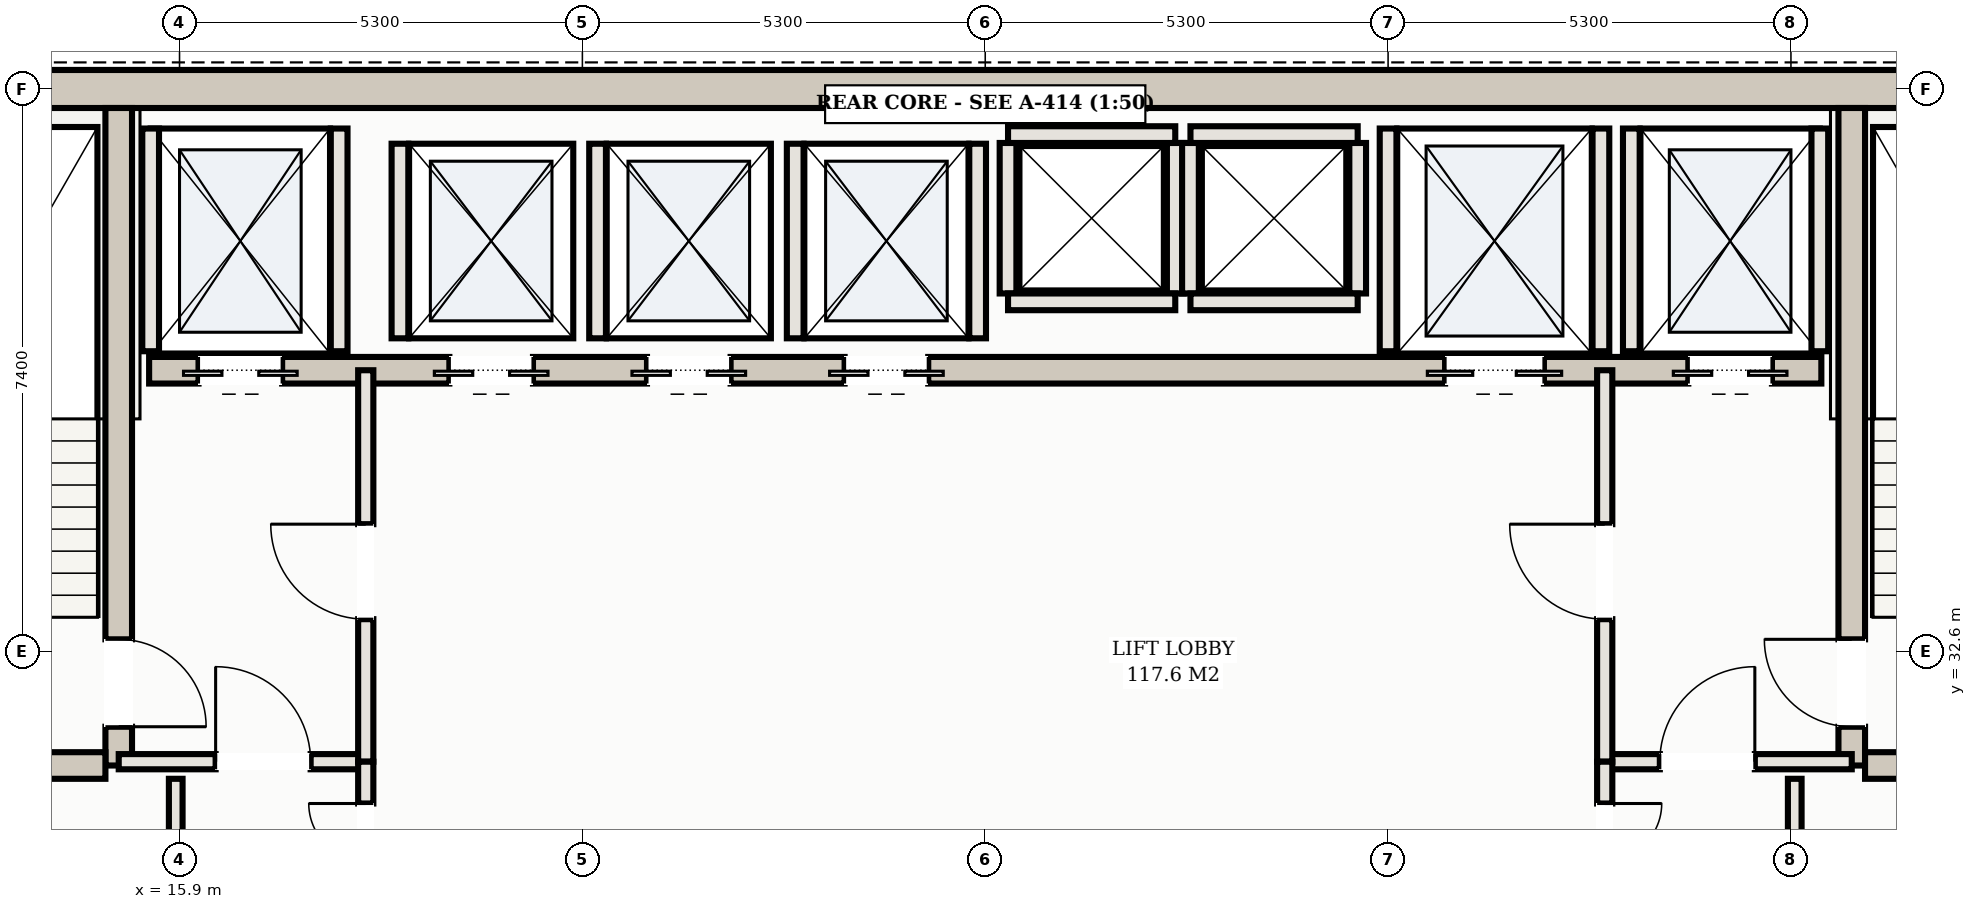
"""IFC4 building model, lengths in metres.
Left out: names, types, materials, properties, quantities, classifications, styles, units other than length and angle.
Written with IfcOpenShell. Run it as: python <this file> out.ifc"""

import sys

from ifc_helpers import new_model, si_unit, direction, frame, frame_2d, origin, place, context, subcontext, project, spatial, rectangle, extrude, element, fill, save


model = new_model("IFC4")
c1 = context("Model", 3, precision=1e-05, world=origin(), true_north=direction((0.0, 1.0)))
c2 = subcontext(c1, "Body", "Model", "MODEL_VIEW")
j1 = project(units=[si_unit("LENGTHUNIT", "METRE"), si_unit("PLANEANGLEUNIT", "RADIAN")], contexts=[c1])
p1 = place(None, origin())
s1 = spatial("IfcSite", under=j1, at=p1, CompositionType="ELEMENT")
p2 = place(p1, origin())
s2 = spatial("IfcBuilding", under=s1, at=p2, CompositionType="ELEMENT")
p3 = place(p2, frame((0.0, 0.0, 213.2)))
s3 = spatial("IfcBuildingStorey", under=s2, at=p3, CompositionType="ELEMENT", Elevation=213.2)
p4 = place(p3, frame((10.35, 40.0, 0.0), z_axis=(0.0, 0.0, 1.0), x_axis=(1.0, 0.0, 0.0)))
e1 = element("IfcWall", 1, at=p4, inside=s3, PredefinedType="SHEAR", context=c2, shape_type="SweptSolid", body=[
    extrude(rectangle(XDim=32.3, YDim=0.5, at=frame_2d((16.15, 0.0))), origin(), (0.0, 0.0, 1.0), 3.11),
])
p5 = place(p3, frame((15.1, 31.1, 0.0), z_axis=(0.0, 0.0, 1.0), x_axis=(0.0, 1.0, 0.0)))
e2 = element("IfcWall", 2, at=p5, inside=s3, PredefinedType="SHEAR", context=c2, shape_type="SweptSolid", body=[
    extrude(rectangle(XDim=8.65, YDim=0.35, at=frame_2d((4.325, 0.0))), origin(), (0.0, 0.0, 1.0), 3.11),
])
p6 = place(p5, frame((0.51, 0.0, 0.0)))
e3 = element("IfcOpeningElement", 3, at=p6, cuts=e2, PredefinedType="OPENING", context=c2, shape_type="SweptSolid", body=[
    extrude(rectangle(XDim=1.15, YDim=2.2, at=frame_2d((0.575, 1.1))), frame((0.0, 0.185, 0.0), z_axis=(0.0, -1.0, 0.0), x_axis=(1.0, 0.0, 0.0)), (0.0, 0.0, 1.0), 0.37),
])
p7 = place(p3, frame((10.85, 31.1, 0.0), z_axis=(0.0, 0.0, 1.0), x_axis=(1.0, 0.0, 0.0)))
e4 = element("IfcWall", 4, at=p7, inside=s3, PredefinedType="SHEAR", context=c2, shape_type="SweptSolid", body=[
    extrude(rectangle(XDim=4.075, YDim=0.35, at=frame_2d((2.038, 0.0))), origin(), (0.0, 0.0, 1.0), 3.11),
])
p8 = place(p3, frame((37.9, 31.1, 0.0), z_axis=(0.0, 0.0, 1.0), x_axis=(0.0, 1.0, 0.0)))
e5 = element("IfcWall", 5, at=p8, inside=s3, PredefinedType="SHEAR", context=c2, shape_type="SweptSolid", body=[
    extrude(rectangle(XDim=8.65, YDim=0.35, at=frame_2d((4.325, 0.0))), origin(), (0.0, 0.0, 1.0), 3.11),
])
p9 = place(p8, frame((0.51, 0.0, 0.0)))
e6 = element("IfcOpeningElement", 6, at=p9, cuts=e5, PredefinedType="OPENING", context=c2, shape_type="SweptSolid", body=[
    extrude(rectangle(XDim=1.15, YDim=2.2, at=frame_2d((0.575, 1.1))), frame((0.0, 0.185, 0.0), z_axis=(0.0, -1.0, 0.0), x_axis=(1.0, 0.0, 0.0)), (0.0, 0.0, 1.0), 0.37),
])
p10 = place(p3, frame((38.075, 31.1, 0.0), z_axis=(0.0, 0.0, 1.0), x_axis=(1.0, 0.0, 0.0)))
e7 = element("IfcWall", 7, at=p10, inside=s3, PredefinedType="SHEAR", context=c2, shape_type="SweptSolid", body=[
    extrude(rectangle(XDim=4.075, YDim=0.35, at=frame_2d((2.038, 0.0))), origin(), (0.0, 0.0, 1.0), 3.11),
])
p11 = place(p3, frame((15.5, 36.3, 0.0), z_axis=(0.0, 0.0, 1.0), x_axis=(1.0, 0.0, 0.0)))
e8 = element("IfcWall", 8, at=p11, inside=s3, PredefinedType="SHEAR", context=c2, shape_type="SweptSolid", body=[
    extrude(rectangle(XDim=22.0, YDim=0.35, at=frame_2d((11.0, 0.0))), origin(), (0.0, 0.0, 1.0), 3.11),
])
p12 = place(p11, frame((0.65, 0.0, 0.0)))
e9 = element("IfcOpeningElement", 9, at=p12, cuts=e8, PredefinedType="OPENING", context=c2, shape_type="SweptSolid", body=[
    extrude(rectangle(XDim=1.1, YDim=2.15, at=frame_2d((0.55, 1.075))), frame((0.0, 0.185, 0.0), z_axis=(0.0, -1.0, 0.0), x_axis=(1.0, 0.0, 0.0)), (0.0, 0.0, 1.0), 0.37),
])
p13 = place(p11, frame((20.25, 0.0, 0.0)))
e10 = element("IfcOpeningElement", 10, at=p13, cuts=e8, PredefinedType="OPENING", context=c2, shape_type="SweptSolid", body=[
    extrude(rectangle(XDim=1.1, YDim=2.15, at=frame_2d((0.55, 1.075))), frame((0.0, 0.185, 0.0), z_axis=(0.0, -1.0, 0.0), x_axis=(1.0, 0.0, 0.0)), (0.0, 0.0, 1.0), 0.37),
])
p14 = place(p11, frame((17.05, 0.0, 0.0)))
e11 = element("IfcOpeningElement", 11, at=p14, cuts=e8, PredefinedType="OPENING", context=c2, shape_type="SweptSolid", body=[
    extrude(rectangle(XDim=1.3, YDim=2.2, at=frame_2d((0.65, 1.1))), frame((0.0, 0.185, 0.0), z_axis=(0.0, -1.0, 0.0), x_axis=(1.0, 0.0, 0.0)), (0.0, 0.0, 1.0), 0.37),
])
p15 = place(p11, frame((3.95, 0.0, 0.0)))
e12 = element("IfcOpeningElement", 12, at=p15, cuts=e8, PredefinedType="OPENING", context=c2, shape_type="SweptSolid", body=[
    extrude(rectangle(XDim=1.1, YDim=2.15, at=frame_2d((0.55, 1.075))), frame((0.0, 0.185, 0.0), z_axis=(0.0, -1.0, 0.0), x_axis=(1.0, 0.0, 0.0)), (0.0, 0.0, 1.0), 0.37),
])
p16 = place(p11, frame((6.55, 0.0, 0.0)))
e13 = element("IfcOpeningElement", 13, at=p16, cuts=e8, PredefinedType="OPENING", context=c2, shape_type="SweptSolid", body=[
    extrude(rectangle(XDim=1.1, YDim=2.15, at=frame_2d((0.55, 1.075))), frame((0.0, 0.185, 0.0), z_axis=(0.0, -1.0, 0.0), x_axis=(1.0, 0.0, 0.0)), (0.0, 0.0, 1.0), 0.37),
])
p17 = place(p11, frame((9.15, 0.0, 0.0)))
e14 = element("IfcOpeningElement", 14, at=p17, cuts=e8, PredefinedType="OPENING", context=c2, shape_type="SweptSolid", body=[
    extrude(rectangle(XDim=1.1, YDim=2.15, at=frame_2d((0.55, 1.075))), frame((0.0, 0.185, 0.0), z_axis=(0.0, -1.0, 0.0), x_axis=(1.0, 0.0, 0.0)), (0.0, 0.0, 1.0), 0.37),
])
for number, where, z_axis, x_axis in (
    (15, (15.52, 36.55, 0.0), (0.0, 0.0, 1.0), (0.0, 1.0, 0.0)),
    (16, (18.0, 36.55, 0.0), (0.0, 0.0, 1.0), (0.0, 1.0, 0.0)),
    (17, (35.0, 36.55, 0.0), (0.0, 0.0, 1.0), (0.0, 1.0, 0.0)),
    (18, (37.48, 36.55, 0.0), (0.0, 0.0, 1.0), (0.0, 1.0, 0.0)),
    (19, (31.8, 36.55, 0.0), (0.0, 0.0, 1.0), (0.0, 1.0, 0.0)),
    (20, (34.6, 36.55, 0.0), (0.0, 0.0, 1.0), (0.0, 1.0, 0.0)),
):
    element("IfcWall", number, at=place(p3, frame(where, z_axis=z_axis, x_axis=x_axis)), inside=s3, PredefinedType="SOLIDWALL", context=c2, shape_type="SweptSolid", body=[
        extrude(rectangle(XDim=2.93, YDim=0.22, at=frame_2d((1.465, 0.0))), origin(), (0.0, 0.0, 1.0), 3.11),
    ])
for number, where, z_axis, x_axis in (
    (21, (18.8, 36.72, 0.0), (0.0, 0.0, 1.0), (0.0, 1.0, 0.0)),
    (22, (21.4, 36.72, 0.0), (0.0, 0.0, 1.0), (0.0, 1.0, 0.0)),
    (23, (24.0, 36.72, 0.0), (0.0, 0.0, 1.0), (0.0, 1.0, 0.0)),
    (24, (26.4, 36.72, 0.0), (0.0, 0.0, 1.0), (0.0, 1.0, 0.0)),
):
    element("IfcWall", number, at=place(p3, frame(where, z_axis=z_axis, x_axis=x_axis)), inside=s3, PredefinedType="SOLIDWALL", context=c2, shape_type="SweptSolid", body=[
        extrude(rectangle(XDim=2.56, YDim=0.22, at=frame_2d((1.28, 0.0))), origin(), (0.0, 0.0, 1.0), 3.11),
    ])
for number, where, z_axis, x_axis in (
    (25, (26.8, 37.31, 0.0), (0.0, 0.0, 1.0), (0.0, 1.0, 0.0)),
    (26, (29.0, 37.31, 0.0), (0.0, 0.0, 1.0), (0.0, 1.0, 0.0)),
):
    element("IfcWall", number, at=place(p3, frame(where, z_axis=z_axis, x_axis=x_axis)), inside=s3, PredefinedType="SOLIDWALL", context=c2, shape_type="SweptSolid", body=[
        extrude(rectangle(XDim=1.98, YDim=0.22, at=frame_2d((0.99, 0.0))), origin(), (0.0, 0.0, 1.0), 3.11),
    ])
for number, where, z_axis, x_axis in (
    (27, (26.8, 39.4, 0.0), (0.0, 0.0, 1.0), (1.0, 0.0, 0.0)),
    (28, (26.8, 37.2, 0.0), (0.0, 0.0, 1.0), (1.0, 0.0, 0.0)),
):
    element("IfcWall", number, at=place(p3, frame(where, z_axis=z_axis, x_axis=x_axis)), inside=s3, PredefinedType="SOLIDWALL", context=c2, shape_type="SweptSolid", body=[
        extrude(rectangle(XDim=2.2, YDim=0.22, at=frame_2d((1.1, 0.0))), origin(), (0.0, 0.0, 1.0), 3.11),
    ])
for number, where, z_axis, x_axis in (
    (29, (29.2, 37.31, 0.0), (0.0, 0.0, 1.0), (0.0, 1.0, 0.0)),
    (30, (31.4, 37.31, 0.0), (0.0, 0.0, 1.0), (0.0, 1.0, 0.0)),
):
    element("IfcWall", number, at=place(p3, frame(where, z_axis=z_axis, x_axis=x_axis)), inside=s3, PredefinedType="SOLIDWALL", context=c2, shape_type="SweptSolid", body=[
        extrude(rectangle(XDim=1.98, YDim=0.22, at=frame_2d((0.99, 0.0))), origin(), (0.0, 0.0, 1.0), 3.11),
    ])
for number, where, z_axis, x_axis in (
    (31, (29.2, 39.4, 0.0), (0.0, 0.0, 1.0), (1.0, 0.0, 0.0)),
    (32, (29.2, 37.2, 0.0), (0.0, 0.0, 1.0), (1.0, 0.0, 0.0)),
):
    element("IfcWall", number, at=place(p3, frame(where, z_axis=z_axis, x_axis=x_axis)), inside=s3, PredefinedType="SOLIDWALL", context=c2, shape_type="SweptSolid", body=[
        extrude(rectangle(XDim=2.2, YDim=0.22, at=frame_2d((1.1, 0.0))), origin(), (0.0, 0.0, 1.0), 3.11),
    ])
p18 = place(p3, frame((15.1, 31.15, 0.0), z_axis=(0.0, 0.0, 1.0), x_axis=(1.0, 0.0, 0.0)))
e33 = element("IfcWall", 33, at=p18, inside=s3, PredefinedType="PARTITIONING", context=c2, shape_type="SweptSolid", body=[
    extrude(rectangle(XDim=3.25, YDim=0.2, at=frame_2d((1.625, 0.0))), origin(), (0.0, 0.0, 1.0), 2.43),
])
p19 = place(p18, frame((1.275, 0.0, 0.0)))
e34 = element("IfcOpeningElement", 34, at=p19, cuts=e33, PredefinedType="OPENING", context=c2, shape_type="SweptSolid", body=[
    extrude(rectangle(XDim=1.25, YDim=2.2, at=frame_2d((0.625, 1.1))), frame((0.0, 0.11, 0.0), z_axis=(0.0, -1.0, 0.0), x_axis=(1.0, 0.0, 0.0)), (0.0, 0.0, 1.0), 0.22),
])
p20 = place(p3, frame((18.35, 31.15, 0.0), z_axis=(0.0, 0.0, 1.0), x_axis=(0.0, 1.0, 0.0)))
e35 = element("IfcWall", 35, at=p20, inside=s3, PredefinedType="PARTITIONING", context=c2, shape_type="SweptSolid", body=[
    extrude(rectangle(XDim=5.15, YDim=0.2, at=frame_2d((2.575, 0.0))), origin(), (0.0, 0.0, 1.0), 2.43),
])
p21 = place(p20, frame((1.875, 0.0, 0.0)))
e36 = element("IfcOpeningElement", 36, at=p21, cuts=e35, PredefinedType="OPENING", context=c2, shape_type="SweptSolid", body=[
    extrude(rectangle(XDim=1.25, YDim=2.2, at=frame_2d((0.625, 1.1))), frame((0.0, 0.11, 0.0), z_axis=(0.0, -1.0, 0.0), x_axis=(1.0, 0.0, 0.0)), (0.0, 0.0, 1.0), 0.22),
])
p22 = place(p3, frame((34.65, 31.15, 0.0), z_axis=(0.0, 0.0, 1.0), x_axis=(1.0, 0.0, 0.0)))
e37 = element("IfcWall", 37, at=p22, inside=s3, PredefinedType="PARTITIONING", context=c2, shape_type="SweptSolid", body=[
    extrude(rectangle(XDim=3.25, YDim=0.2, at=frame_2d((1.625, 0.0))), origin(), (0.0, 0.0, 1.0), 2.43),
])
p23 = place(p22, frame((0.725, 0.0, 0.0)))
e38 = element("IfcOpeningElement", 38, at=p23, cuts=e37, PredefinedType="OPENING", context=c2, shape_type="SweptSolid", body=[
    extrude(rectangle(XDim=1.25, YDim=2.2, at=frame_2d((0.625, 1.1))), frame((0.0, 0.11, 0.0), z_axis=(0.0, -1.0, 0.0), x_axis=(1.0, 0.0, 0.0)), (0.0, 0.0, 1.0), 0.22),
])
p24 = place(p3, frame((34.65, 31.15, 0.0), z_axis=(0.0, 0.0, 1.0), x_axis=(0.0, 1.0, 0.0)))
e39 = element("IfcWall", 39, at=p24, inside=s3, PredefinedType="PARTITIONING", context=c2, shape_type="SweptSolid", body=[
    extrude(rectangle(XDim=5.15, YDim=0.2, at=frame_2d((2.575, 0.0))), origin(), (0.0, 0.0, 1.0), 2.43),
])
p25 = place(p24, frame((1.875, 0.0, 0.0)))
e40 = element("IfcOpeningElement", 40, at=p25, cuts=e39, PredefinedType="OPENING", context=c2, shape_type="SweptSolid", body=[
    extrude(rectangle(XDim=1.25, YDim=2.2, at=frame_2d((0.625, 1.1))), frame((0.0, 0.11, 0.0), z_axis=(0.0, -1.0, 0.0), x_axis=(1.0, 0.0, 0.0)), (0.0, 0.0, 1.0), 0.22),
])
p26 = place(p3, frame((15.85, 25.45, 0.0), z_axis=(0.0, 0.0, 1.0), x_axis=(0.0, 1.0, 0.0)))
e41 = element("IfcWall", 41, at=p26, inside=s3, PredefinedType="PARTITIONING", context=c2, shape_type="SweptSolid", body=[
    extrude(rectangle(XDim=5.475, YDim=0.18, at=frame_2d((2.738, 0.0))), origin(), (0.0, 0.0, 1.0), 2.43),
])
p27 = place(p26, frame((0.6, 0.0, 0.0)))
e42 = element("IfcOpeningElement", 42, at=p27, cuts=e41, PredefinedType="OPENING", context=c2, shape_type="SweptSolid", body=[
    extrude(rectangle(XDim=0.9, YDim=2.15, at=frame_2d((0.45, 1.075))), frame((0.0, 0.1, 0.0), z_axis=(0.0, -1.0, 0.0), x_axis=(1.0, 0.0, 0.0)), (0.0, 0.0, 1.0), 0.2),
])
p28 = place(p26, frame((3.302, 0.0, 0.0)))
e43 = element("IfcOpeningElement", 43, at=p28, cuts=e41, PredefinedType="OPENING", context=c2, shape_type="SweptSolid", body=[
    extrude(rectangle(XDim=0.92, YDim=2.15, at=frame_2d((0.46, 1.075))), frame((0.0, 0.1, 0.0), z_axis=(0.0, -1.0, 0.0), x_axis=(1.0, 0.0, 0.0)), (0.0, 0.0, 1.0), 0.2),
])
p29 = place(p3, frame((37.15, 25.45, 0.0), z_axis=(0.0, 0.0, 1.0), x_axis=(0.0, 1.0, 0.0)))
e44 = element("IfcWall", 44, at=p29, inside=s3, PredefinedType="PARTITIONING", context=c2, shape_type="SweptSolid", body=[
    extrude(rectangle(XDim=5.475, YDim=0.18, at=frame_2d((2.738, 0.0))), origin(), (0.0, 0.0, 1.0), 2.43),
])
p30 = place(p29, frame((2.277, 0.0, 0.0)))
e45 = element("IfcOpeningElement", 45, at=p30, cuts=e44, PredefinedType="OPENING", context=c2, shape_type="SweptSolid", body=[
    extrude(rectangle(XDim=0.92, YDim=2.15, at=frame_2d((0.46, 1.075))), frame((0.0, 0.1, 0.0), z_axis=(0.0, -1.0, 0.0), x_axis=(1.0, 0.0, 0.0)), (0.0, 0.0, 1.0), 0.2),
])
p31 = place(p3, frame((18.35, 28.55, 0.0), z_axis=(0.0, 0.0, 1.0), x_axis=(0.0, 1.0, 0.0)))
e46 = element("IfcWall", 46, at=p31, inside=s3, PredefinedType="PARTITIONING", context=c2, shape_type="SweptSolid", body=[
    extrude(rectangle(XDim=2.6, YDim=0.2, at=frame_2d((1.3, 0.0))), origin(), (0.0, 0.0, 1.0), 2.43),
])
p32 = place(p31, frame((0.55, 0.0, 0.0)))
e47 = element("IfcOpeningElement", 47, at=p32, cuts=e46, PredefinedType="OPENING", context=c2, shape_type="SweptSolid", body=[
    extrude(rectangle(XDim=1.5, YDim=2.25, at=frame_2d((0.75, 1.125))), frame((0.0, 0.11, 0.0), z_axis=(0.0, -1.0, 0.0), x_axis=(1.0, 0.0, 0.0)), (0.0, 0.0, 1.0), 0.22),
])
p33 = place(p3, frame((34.65, 28.55, 0.0), z_axis=(0.0, 0.0, 1.0), x_axis=(0.0, 1.0, 0.0)))
e48 = element("IfcWall", 48, at=p33, inside=s3, PredefinedType="PARTITIONING", context=c2, shape_type="SweptSolid", body=[
    extrude(rectangle(XDim=2.6, YDim=0.2, at=frame_2d((1.3, 0.0))), origin(), (0.0, 0.0, 1.0), 2.43),
])
p34 = place(p33, frame((0.55, 0.0, 0.0)))
e49 = element("IfcOpeningElement", 49, at=p34, cuts=e48, PredefinedType="OPENING", context=c2, shape_type="SweptSolid", body=[
    extrude(rectangle(XDim=1.5, YDim=2.25, at=frame_2d((0.75, 1.125))), frame((0.0, 0.11, 0.0), z_axis=(0.0, -1.0, 0.0), x_axis=(1.0, 0.0, 0.0)), (0.0, 0.0, 1.0), 0.22),
])
p35 = place(p12, frame((1.1, 0.0, 0.0), z_axis=(0.0, 0.0, 1.0), x_axis=(-1.0, 0.0, 0.0)))
e50 = element("IfcDoor", 50, at=p35, inside=s3, OperationType="DOUBLE_DOOR_SLIDING", PredefinedType="DOOR", context=c2, shape_type="SweptSolid", body=[
    extrude(rectangle(XDim=1.1, YDim=2.15, at=frame_2d((0.55, 1.075))), frame((0.0, 0.025, 0.0), z_axis=(0.0, -1.0, 0.0), x_axis=(1.0, 0.0, 0.0)), (0.0, 0.0, 1.0), 0.05),
])
fill(e9, e50)
p36 = place(p13, frame((1.1, 0.0, 0.0), z_axis=(0.0, 0.0, 1.0), x_axis=(-1.0, 0.0, 0.0)))
e51 = element("IfcDoor", 51, at=p36, inside=s3, OperationType="DOUBLE_DOOR_SLIDING", PredefinedType="DOOR", context=c2, shape_type="SweptSolid", body=[
    extrude(rectangle(XDim=1.1, YDim=2.15, at=frame_2d((0.55, 1.075))), frame((0.0, 0.025, 0.0), z_axis=(0.0, -1.0, 0.0), x_axis=(1.0, 0.0, 0.0)), (0.0, 0.0, 1.0), 0.05),
])
fill(e10, e51)
p37 = place(p14, frame((1.3, 0.0, 0.0), z_axis=(0.0, 0.0, 1.0), x_axis=(-1.0, 0.0, 0.0)))
e52 = element("IfcDoor", 52, at=p37, inside=s3, OperationType="DOUBLE_DOOR_SLIDING", PredefinedType="DOOR", context=c2, shape_type="SweptSolid", body=[
    extrude(rectangle(XDim=1.3, YDim=2.2, at=frame_2d((0.65, 1.1))), frame((0.0, 0.025, 0.0), z_axis=(0.0, -1.0, 0.0), x_axis=(1.0, 0.0, 0.0)), (0.0, 0.0, 1.0), 0.05),
])
fill(e11, e52)
p38 = place(p15, frame((1.1, 0.0, 0.0), z_axis=(0.0, 0.0, 1.0), x_axis=(-1.0, 0.0, 0.0)))
e53 = element("IfcDoor", 53, at=p38, inside=s3, OperationType="DOUBLE_DOOR_SLIDING", PredefinedType="DOOR", context=c2, shape_type="SweptSolid", body=[
    extrude(rectangle(XDim=1.1, YDim=2.15, at=frame_2d((0.55, 1.075))), frame((0.0, 0.025, 0.0), z_axis=(0.0, -1.0, 0.0), x_axis=(1.0, 0.0, 0.0)), (0.0, 0.0, 1.0), 0.05),
])
fill(e12, e53)
p39 = place(p16, frame((1.1, 0.0, 0.0), z_axis=(0.0, 0.0, 1.0), x_axis=(-1.0, 0.0, 0.0)))
e54 = element("IfcDoor", 54, at=p39, inside=s3, OperationType="DOUBLE_DOOR_SLIDING", PredefinedType="DOOR", context=c2, shape_type="SweptSolid", body=[
    extrude(rectangle(XDim=1.1, YDim=2.15, at=frame_2d((0.55, 1.075))), frame((0.0, 0.025, 0.0), z_axis=(0.0, -1.0, 0.0), x_axis=(1.0, 0.0, 0.0)), (0.0, 0.0, 1.0), 0.05),
])
fill(e13, e54)
p40 = place(p17, frame((1.1, 0.0, 0.0), z_axis=(0.0, 0.0, 1.0), x_axis=(-1.0, 0.0, 0.0)))
e55 = element("IfcDoor", 55, at=p40, inside=s3, OperationType="DOUBLE_DOOR_SLIDING", PredefinedType="DOOR", context=c2, shape_type="SweptSolid", body=[
    extrude(rectangle(XDim=1.1, YDim=2.15, at=frame_2d((0.55, 1.075))), frame((0.0, 0.025, 0.0), z_axis=(0.0, -1.0, 0.0), x_axis=(1.0, 0.0, 0.0)), (0.0, 0.0, 1.0), 0.05),
])
fill(e14, e55)
p41 = place(p19, origin())
e56 = element("IfcDoor", 56, at=p41, inside=s3, OperationType="SINGLE_SWING_LEFT", PredefinedType="DOOR", context=c2, shape_type="SweptSolid", body=[
    extrude(rectangle(XDim=1.25, YDim=2.2, at=frame_2d((0.625, 1.1))), frame((0.0, 0.025, 0.0), z_axis=(0.0, -1.0, 0.0), x_axis=(1.0, 0.0, 0.0)), (0.0, 0.0, 1.0), 0.05),
])
fill(e34, e56)
p42 = place(p21, origin())
e57 = element("IfcDoor", 57, at=p42, inside=s3, OperationType="SINGLE_SWING_RIGHT", PredefinedType="DOOR", context=c2, shape_type="SweptSolid", body=[
    extrude(rectangle(XDim=1.25, YDim=2.2, at=frame_2d((0.625, 1.1))), frame((0.0, 0.025, 0.0), z_axis=(0.0, -1.0, 0.0), x_axis=(1.0, 0.0, 0.0)), (0.0, 0.0, 1.0), 0.05),
])
fill(e36, e57)
p43 = place(p23, origin())
e58 = element("IfcDoor", 58, at=p43, inside=s3, OperationType="SINGLE_SWING_RIGHT", PredefinedType="DOOR", context=c2, shape_type="SweptSolid", body=[
    extrude(rectangle(XDim=1.25, YDim=2.2, at=frame_2d((0.625, 1.1))), frame((0.0, 0.025, 0.0), z_axis=(0.0, -1.0, 0.0), x_axis=(1.0, 0.0, 0.0)), (0.0, 0.0, 1.0), 0.05),
])
fill(e38, e58)
p44 = place(p25, origin())
e59 = element("IfcDoor", 59, at=p44, inside=s3, OperationType="SINGLE_SWING_RIGHT", PredefinedType="DOOR", context=c2, shape_type="SweptSolid", body=[
    extrude(rectangle(XDim=1.25, YDim=2.2, at=frame_2d((0.625, 1.1))), frame((0.0, 0.025, 0.0), z_axis=(0.0, -1.0, 0.0), x_axis=(1.0, 0.0, 0.0)), (0.0, 0.0, 1.0), 0.05),
])
fill(e40, e59)
p45 = place(p6, frame((1.15, 0.0, 0.0), z_axis=(0.0, 0.0, 1.0), x_axis=(-1.0, 0.0, 0.0)))
e60 = element("IfcDoor", 60, at=p45, inside=s3, OperationType="SINGLE_SWING_RIGHT", PredefinedType="DOOR", context=c2, shape_type="SweptSolid", body=[
    extrude(rectangle(XDim=1.15, YDim=2.2, at=frame_2d((0.575, 1.1))), frame((0.0, 0.025, 0.0), z_axis=(0.0, -1.0, 0.0), x_axis=(1.0, 0.0, 0.0)), (0.0, 0.0, 1.0), 0.05),
])
fill(e3, e60)
p46 = place(p9, origin())
e61 = element("IfcDoor", 61, at=p46, inside=s3, OperationType="SINGLE_SWING_RIGHT", PredefinedType="DOOR", context=c2, shape_type="SweptSolid", body=[
    extrude(rectangle(XDim=1.15, YDim=2.2, at=frame_2d((0.575, 1.1))), frame((0.0, 0.025, 0.0), z_axis=(0.0, -1.0, 0.0), x_axis=(1.0, 0.0, 0.0)), (0.0, 0.0, 1.0), 0.05),
])
fill(e6, e61)
p47 = place(p32, origin())
e62 = element("IfcDoor", 62, at=p47, inside=s3, OperationType="DOUBLE_DOOR_SINGLE_SWING", PredefinedType="DOOR", context=c2, shape_type="SweptSolid", body=[
    extrude(rectangle(XDim=1.5, YDim=2.25, at=frame_2d((0.75, 1.125))), frame((0.0, 0.025, 0.0), z_axis=(0.0, -1.0, 0.0), x_axis=(1.0, 0.0, 0.0)), (0.0, 0.0, 1.0), 0.05),
])
fill(e47, e62)
p48 = place(p34, frame((1.5, 0.0, 0.0), z_axis=(0.0, 0.0, 1.0), x_axis=(-1.0, 0.0, 0.0)))
e63 = element("IfcDoor", 63, at=p48, inside=s3, OperationType="DOUBLE_DOOR_SINGLE_SWING", PredefinedType="DOOR", context=c2, shape_type="SweptSolid", body=[
    extrude(rectangle(XDim=1.5, YDim=2.25, at=frame_2d((0.75, 1.125))), frame((0.0, 0.025, 0.0), z_axis=(0.0, -1.0, 0.0), x_axis=(1.0, 0.0, 0.0)), (0.0, 0.0, 1.0), 0.05),
])
fill(e49, e63)
save(model, sys.argv[1])
